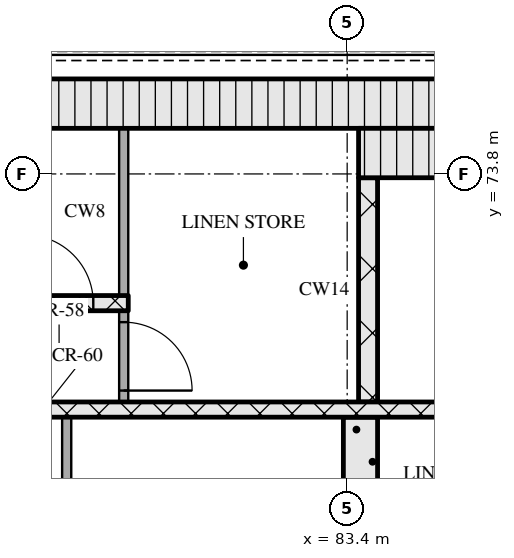
"""IFC4 building model, lengths in metres.
Left out: names, types, materials, properties, quantities, classifications, styles, units other than length and angle.
Written with IfcOpenShell. Run it as: python <this file> out.ifc"""

import sys

from ifc_helpers import new_model, si_unit, direction, frame, frame_2d, origin, place, context, subcontext, project, spatial, rectangle, extrude, element, fill, save


model = new_model("IFC4")
c1 = context("Model", 3, precision=1e-05, world=origin(), true_north=direction((0.0, 1.0)))
c2 = subcontext(c1, "Body", "Model", "MODEL_VIEW")
j1 = project(units=[si_unit("LENGTHUNIT", "METRE"), si_unit("PLANEANGLEUNIT", "RADIAN")], contexts=[c1])
p1 = place(None, origin())
s1 = spatial("IfcSite", under=j1, at=p1, CompositionType="ELEMENT")
p2 = place(p1, origin())
s2 = spatial("IfcBuilding", under=s1, at=p2, CompositionType="ELEMENT")
p3 = place(p2, frame((0.0, 0.0, 230.7)))
s3 = spatial("IfcBuildingStorey", under=s2, at=p3, CompositionType="ELEMENT", Elevation=230.7)
p4 = place(p3, frame((67.15, 74.725, 0.0), z_axis=(0.0, 0.0, 1.0), x_axis=(1.0, 0.0, 0.0)))
e1 = element("IfcWall", 1, at=p4, inside=s3, PredefinedType="SOLIDWALL", context=c2, shape_type="SweptSolid", body=[
    extrude(rectangle(XDim=40.9, YDim=0.65, at=frame_2d((20.45, 0.0))), origin(), (0.0, 0.0, 1.0), 3.32),
])
p5 = place(p3, frame((79.71, 68.0, 0.0), z_axis=(0.0, 0.0, 1.0), x_axis=(0.0, 1.0, 0.0)))
e2 = element("IfcWall", 2, at=p5, inside=s3, PredefinedType="PARTITIONING", context=c2, shape_type="SweptSolid", body=[
    extrude(rectangle(XDim=2.6, YDim=0.12, at=frame_2d((1.3, 0.0))), origin(), (0.0, 0.0, 1.0), 3.32),
])
p6 = place(p3, frame((83.575, 68.0, 0.0), z_axis=(0.0, 0.0, 1.0), x_axis=(0.0, 1.0, 0.0)))
e3 = element("IfcWall", 3, at=p6, inside=s3, PredefinedType="SOLIDWALL", context=c2, shape_type="SweptSolid", body=[
    extrude(rectangle(XDim=2.6, YDim=0.45, at=frame_2d((1.3, 0.0))), origin(), (0.0, 0.0, 1.0), 3.32),
])
p7 = place(p3, frame((67.8, 70.7, 0.0), z_axis=(0.0, 0.0, 1.0), x_axis=(1.0, 0.0, 0.0)))
e4 = element("IfcWall", 4, at=p7, inside=s3, PredefinedType="SOLIDWALL", context=c2, shape_type="SweptSolid", body=[
    extrude(rectangle(XDim=39.6, YDim=0.2, at=frame_2d((19.8, 0.0))), origin(), (0.0, 0.0, 1.0), 3.32),
])
p8 = place(p7, frame((0.65, 0.0, 0.0)))
e5 = element("IfcOpeningElement", 5, at=p8, cuts=e4, PredefinedType="OPENING", context=c2, shape_type="SweptSolid", body=[
    extrude(rectangle(XDim=1.1, YDim=2.1, at=frame_2d((0.55, 1.05))), frame((0.0, 0.11, 0.0), z_axis=(0.0, -1.0, 0.0), x_axis=(1.0, 0.0, 0.0)), (0.0, 0.0, 1.0), 0.22),
])
p9 = place(p7, frame((3.25, 0.0, 0.0)))
e6 = element("IfcOpeningElement", 6, at=p9, cuts=e4, PredefinedType="OPENING", context=c2, shape_type="SweptSolid", body=[
    extrude(rectangle(XDim=1.1, YDim=2.1, at=frame_2d((0.55, 1.05))), frame((0.0, 0.11, 0.0), z_axis=(0.0, -1.0, 0.0), x_axis=(1.0, 0.0, 0.0)), (0.0, 0.0, 1.0), 0.22),
])
p10 = place(p7, frame((5.9, 0.0, 0.0)))
e7 = element("IfcOpeningElement", 7, at=p10, cuts=e4, PredefinedType="OPENING", context=c2, shape_type="SweptSolid", body=[
    extrude(rectangle(XDim=1.0, YDim=2.1, at=frame_2d((0.5, 1.05))), frame((0.0, 0.11, 0.0), z_axis=(0.0, -1.0, 0.0), x_axis=(1.0, 0.0, 0.0)), (0.0, 0.0, 1.0), 0.22),
])
p11 = place(p7, frame((21.7, 0.0, 0.0)))
e8 = element("IfcOpeningElement", 8, at=p11, cuts=e4, PredefinedType="OPENING", context=c2, shape_type="SweptSolid", body=[
    extrude(rectangle(XDim=1.0, YDim=2.1, at=frame_2d((0.5, 1.05))), frame((0.0, 0.11, 0.0), z_axis=(0.0, -1.0, 0.0), x_axis=(1.0, 0.0, 0.0)), (0.0, 0.0, 1.0), 0.22),
])
p12 = place(p7, frame((32.7, 0.0, 0.0)))
e9 = element("IfcOpeningElement", 9, at=p12, cuts=e4, PredefinedType="OPENING", context=c2, shape_type="SweptSolid", body=[
    extrude(rectangle(XDim=1.0, YDim=2.1, at=frame_2d((0.5, 1.05))), frame((0.0, 0.11, 0.0), z_axis=(0.0, -1.0, 0.0), x_axis=(1.0, 0.0, 0.0)), (0.0, 0.0, 1.0), 0.22),
])
p13 = place(p7, frame((35.25, 0.0, 0.0)))
e10 = element("IfcOpeningElement", 10, at=p13, cuts=e4, PredefinedType="OPENING", context=c2, shape_type="SweptSolid", body=[
    extrude(rectangle(XDim=1.1, YDim=2.1, at=frame_2d((0.55, 1.05))), frame((0.0, 0.11, 0.0), z_axis=(0.0, -1.0, 0.0), x_axis=(1.0, 0.0, 0.0)), (0.0, 0.0, 1.0), 0.22),
])
p14 = place(p7, frame((37.85, 0.0, 0.0)))
e11 = element("IfcOpeningElement", 11, at=p14, cuts=e4, PredefinedType="OPENING", context=c2, shape_type="SweptSolid", body=[
    extrude(rectangle(XDim=1.1, YDim=2.1, at=frame_2d((0.55, 1.05))), frame((0.0, 0.11, 0.0), z_axis=(0.0, -1.0, 0.0), x_axis=(1.0, 0.0, 0.0)), (0.0, 0.0, 1.0), 0.22),
])
p15 = place(p3, frame((80.46, 70.8, 0.0), z_axis=(0.0, 0.0, 1.0), x_axis=(0.0, 1.0, 0.0)))
e12 = element("IfcWall", 12, at=p15, inside=s3, PredefinedType="PARTITIONING", context=c2, shape_type="SweptSolid", body=[
    extrude(rectangle(XDim=1.2, YDim=0.12, at=frame_2d((0.6, 0.0))), origin(), (0.0, 0.0, 1.0), 3.32),
])
p16 = place(p15, frame((0.15, 0.0, 0.0)))
e13 = element("IfcOpeningElement", 13, at=p16, cuts=e12, PredefinedType="OPENING", context=c2, shape_type="SweptSolid", body=[
    extrude(rectangle(XDim=0.9, YDim=2.1, at=frame_2d((0.45, 1.05))), frame((0.0, 0.07, 0.0), z_axis=(0.0, -1.0, 0.0), x_axis=(1.0, 0.0, 0.0)), (0.0, 0.0, 1.0), 0.14),
])
p17 = place(p3, frame((83.675, 70.8, 0.0), z_axis=(0.0, 0.0, 1.0), x_axis=(0.0, 1.0, 0.0)))
e14 = element("IfcWall", 14, at=p17, inside=s3, PredefinedType="SOLIDWALL", context=c2, shape_type="SweptSolid", body=[
    extrude(rectangle(XDim=2.95, YDim=0.25, at=frame_2d((1.475, 0.0))), origin(), (0.0, 0.0, 1.0), 3.32),
])
p18 = place(p3, frame((72.8, 72.1, 0.0), z_axis=(0.0, 0.0, 1.0), x_axis=(1.0, 0.0, 0.0)))
e15 = element("IfcWall", 15, at=p18, inside=s3, PredefinedType="SOLIDWALL", context=c2, shape_type="SweptSolid", body=[
    extrude(rectangle(XDim=7.72, YDim=0.2, at=frame_2d((3.86, 0.0))), origin(), (0.0, 0.0, 1.0), 3.32),
])
p19 = place(p18, frame((1.25, 0.0, 0.0)))
e16 = element("IfcOpeningElement", 16, at=p19, cuts=e15, PredefinedType="OPENING", context=c2, shape_type="SweptSolid", body=[
    extrude(rectangle(XDim=0.9, YDim=2.1, at=frame_2d((0.45, 1.05))), frame((0.0, 0.11, 0.0), z_axis=(0.0, -1.0, 0.0), x_axis=(1.0, 0.0, 0.0)), (0.0, 0.0, 1.0), 0.22),
])
p20 = place(p18, frame((4.2, 0.0, 0.0)))
e17 = element("IfcOpeningElement", 17, at=p20, cuts=e15, PredefinedType="OPENING", context=c2, shape_type="SweptSolid", body=[
    extrude(rectangle(XDim=0.9, YDim=2.1, at=frame_2d((0.45, 1.05))), frame((0.0, 0.11, 0.0), z_axis=(0.0, -1.0, 0.0), x_axis=(1.0, 0.0, 0.0)), (0.0, 0.0, 1.0), 0.22),
])
p21 = place(p18, frame((6.36, 0.0, 0.0)))
e18 = element("IfcOpeningElement", 18, at=p21, cuts=e15, PredefinedType="OPENING", context=c2, shape_type="SweptSolid", body=[
    extrude(rectangle(XDim=0.9, YDim=2.1, at=frame_2d((0.45, 1.05))), frame((0.0, 0.11, 0.0), z_axis=(0.0, -1.0, 0.0), x_axis=(1.0, 0.0, 0.0)), (0.0, 0.0, 1.0), 0.22),
])
p22 = place(p3, frame((80.46, 72.2, 0.0), z_axis=(0.0, 0.0, 1.0), x_axis=(0.0, 1.0, 0.0)))
e19 = element("IfcWall", 19, at=p22, inside=s3, PredefinedType="PARTITIONING", context=c2, shape_type="SweptSolid", body=[
    extrude(rectangle(XDim=2.2, YDim=0.12, at=frame_2d((1.1, 0.0))), origin(), (0.0, 0.0, 1.0), 3.32),
])
p23 = place(p3, frame((83.55, 74.075, 0.0), z_axis=(0.0, 0.0, 1.0), x_axis=(1.0, 0.0, 0.0)))
e20 = element("IfcWall", 20, at=p23, inside=s3, PredefinedType="SOLIDWALL", context=c2, shape_type="SweptSolid", body=[
    extrude(rectangle(XDim=8.1, YDim=0.65, at=frame_2d((4.05, 0.0))), origin(), (0.0, 0.0, 1.0), 3.32),
])
p24 = place(p16, origin())
e21 = element("IfcDoor", 21, at=p24, inside=s3, OperationType="SINGLE_SWING_RIGHT", PredefinedType="DOOR", context=c2, shape_type="SweptSolid", body=[
    extrude(rectangle(XDim=0.9, YDim=2.1, at=frame_2d((0.45, 1.05))), frame((0.0, 0.025, 0.0), z_axis=(0.0, -1.0, 0.0), x_axis=(1.0, 0.0, 0.0)), (0.0, 0.0, 1.0), 0.05),
])
fill(e13, e21)
p25 = place(p21, origin())
e22 = element("IfcDoor", 22, at=p25, inside=s3, OperationType="SINGLE_SWING_LEFT", PredefinedType="DOOR", context=c2, shape_type="SweptSolid", body=[
    extrude(rectangle(XDim=0.9, YDim=2.1, at=frame_2d((0.45, 1.05))), frame((0.0, 0.025, 0.0), z_axis=(0.0, -1.0, 0.0), x_axis=(1.0, 0.0, 0.0)), (0.0, 0.0, 1.0), 0.05),
])
fill(e18, e22)
save(model, sys.argv[1])
